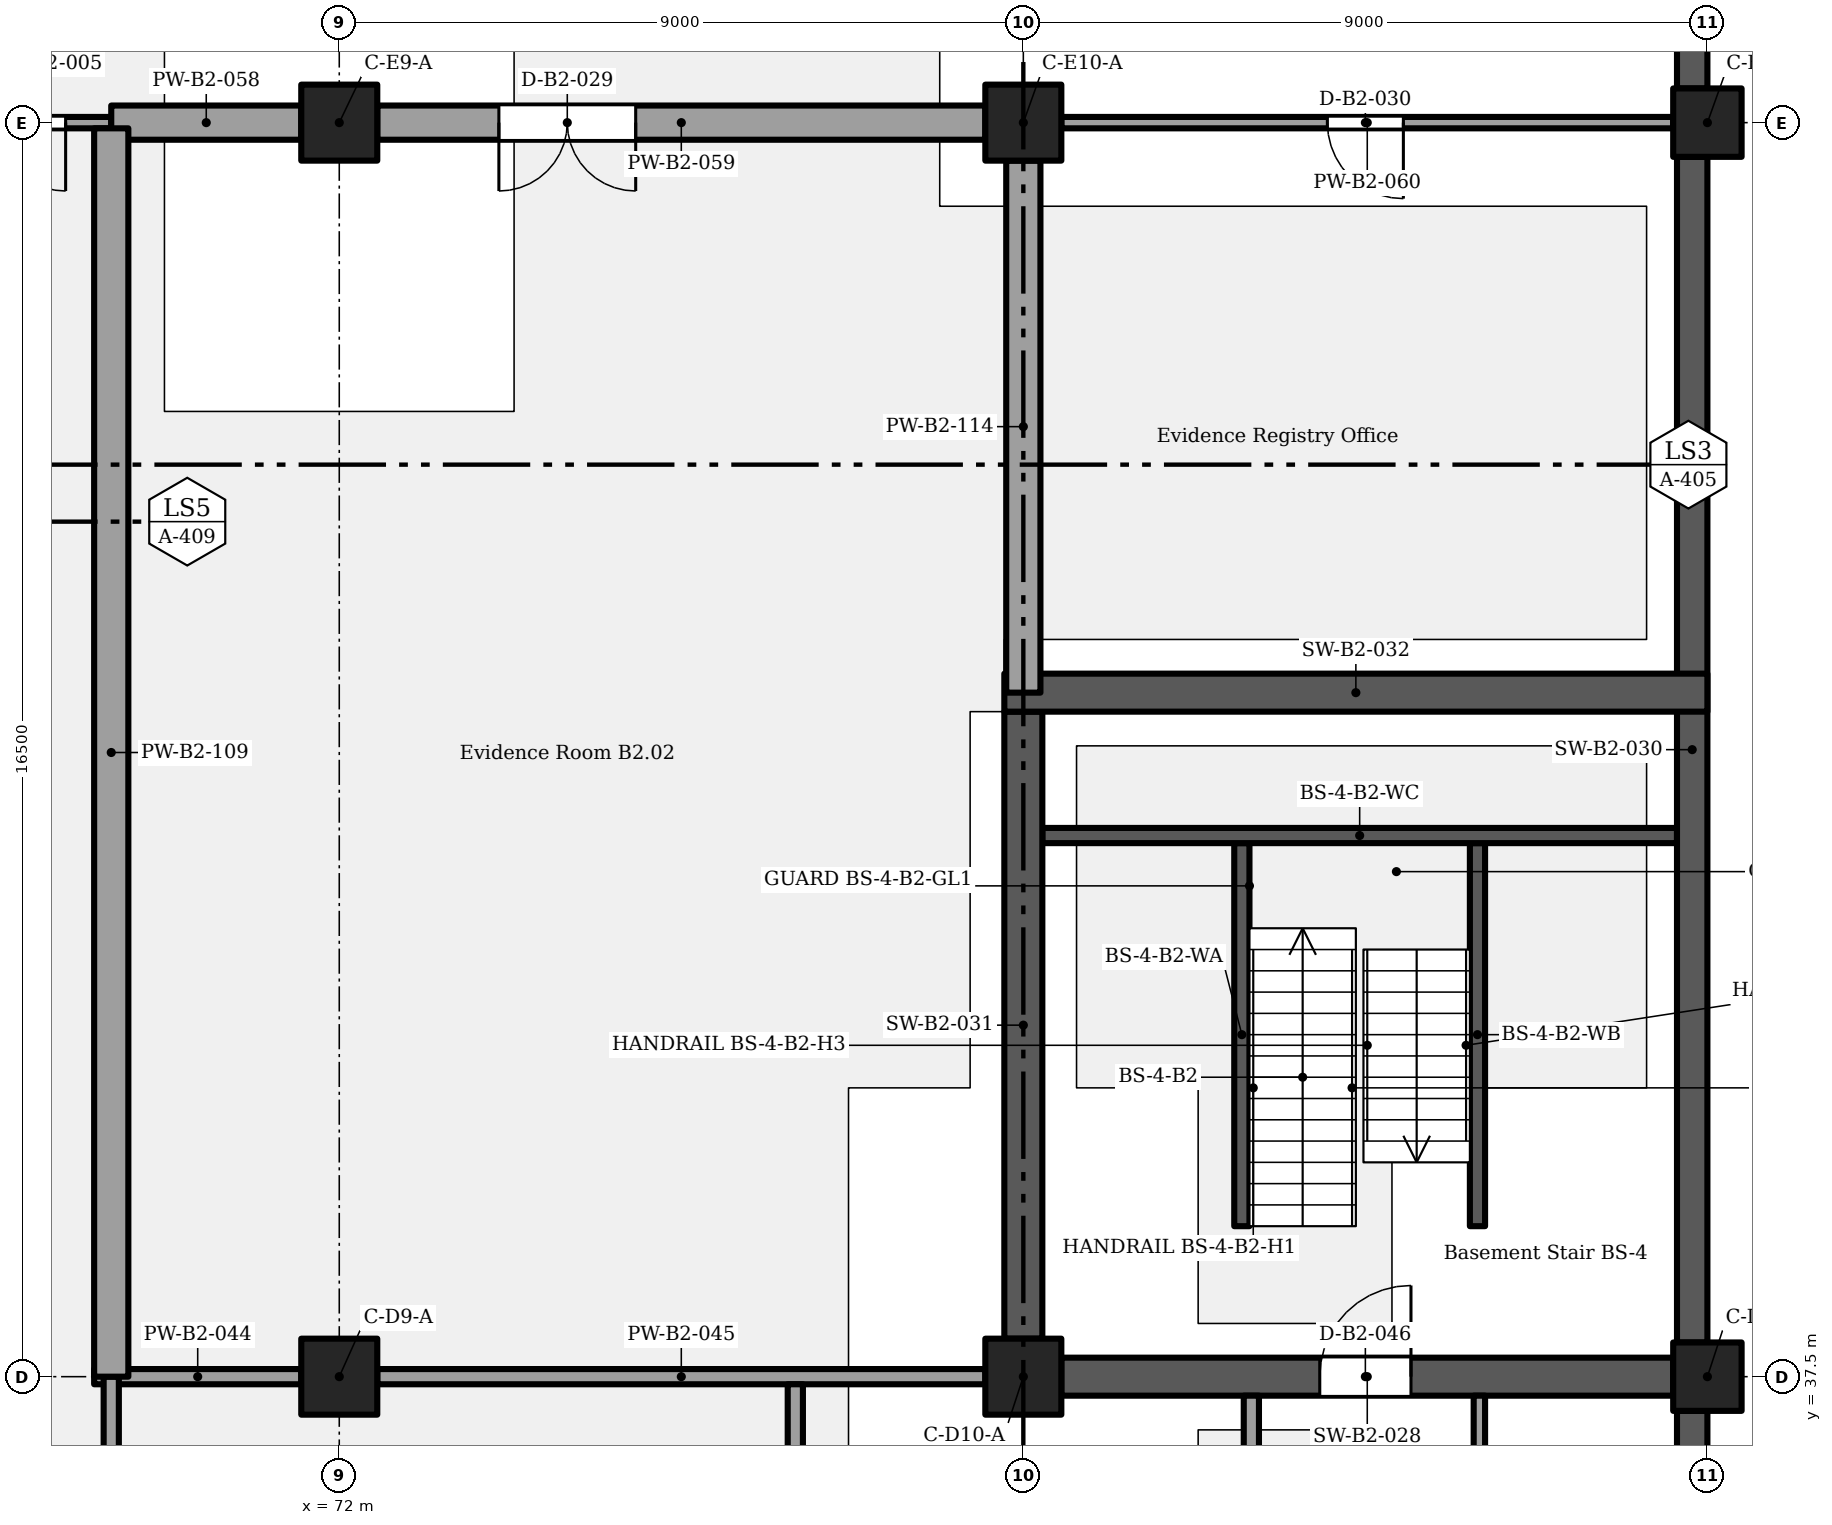
"""IFC4 building model, lengths in metres.
Left out: names, types, materials, properties, quantities, classifications, styles, units other than length and angle.
Written with IfcOpenShell. Run it as: python <this file> out.ifc"""

import sys

from ifc_helpers import new_model, si_unit, direction, frame, frame_2d, origin, origin_2d, place, context, subcontext, project, spatial, rectangle, extrude, element, fill, save


model = new_model("IFC4")
c1 = context("Model", 3, precision=1e-05, world=origin(), true_north=direction((0.0, 1.0)))
c2 = subcontext(c1, "Body", "Model", "MODEL_VIEW")
j1 = project(units=[si_unit("LENGTHUNIT", "METRE"), si_unit("PLANEANGLEUNIT", "RADIAN")], contexts=[c1])
p1 = place(None, origin())
s1 = spatial("IfcSite", under=j1, at=p1, CompositionType="ELEMENT")
p2 = place(p1, origin())
s2 = spatial("IfcBuilding", under=s1, at=p2, CompositionType="ELEMENT")
p3 = place(p2, frame((0.0, 0.0, -8.4)))
s3 = spatial("IfcBuildingStorey", under=s2, at=p3, CompositionType="ELEMENT", Elevation=-8.4)
for number, where, z_axis, x_axis in (
    (1, (72.0, 37.5, 0.0), (0.0, 0.0, 1.0), (1.0, 0.0, 0.0)),
    (2, (81.0, 37.5, 0.0), (0.0, 0.0, 1.0), (1.0, 0.0, 0.0)),
):
    element("IfcColumn", number, at=place(p3, frame(where, z_axis=z_axis, x_axis=x_axis)), inside=s3, PredefinedType="COLUMN", context=c2, shape_type="SweptSolid", body=[
        extrude(rectangle(XDim=1.0, YDim=1.0, at=origin_2d()), origin(), (0.0, 0.0, 1.0), 4.2),
    ])
p4 = place(p3, frame((90.0, 37.5, 0.0), z_axis=(0.0, 0.0, 1.0), x_axis=(1.0, 0.0, 0.0)))
e3 = element("IfcColumn", 3, at=p4, inside=s3, PredefinedType="COLUMN", context=c2, shape_type="SweptSolid", body=[
    extrude(rectangle(XDim=0.9, YDim=0.9, at=origin_2d()), origin(), (0.0, 0.0, 1.0), 4.2),
])
for number, where, z_axis, x_axis in (
    (4, (72.0, 54.0, 0.0), (0.0, 0.0, 1.0), (1.0, 0.0, 0.0)),
    (5, (81.0, 54.0, 0.0), (0.0, 0.0, 1.0), (1.0, 0.0, 0.0)),
):
    element("IfcColumn", number, at=place(p3, frame(where, z_axis=z_axis, x_axis=x_axis)), inside=s3, PredefinedType="COLUMN", context=c2, shape_type="SweptSolid", body=[
        extrude(rectangle(XDim=1.0, YDim=1.0, at=origin_2d()), origin(), (0.0, 0.0, 1.0), 4.2),
    ])
p5 = place(p3, frame((90.0, 54.0, 0.0), z_axis=(0.0, 0.0, 1.0), x_axis=(1.0, 0.0, 0.0)))
e6 = element("IfcColumn", 6, at=p5, inside=s3, PredefinedType="COLUMN", context=c2, shape_type="SweptSolid", body=[
    extrude(rectangle(XDim=0.9, YDim=0.9, at=origin_2d()), origin(), (0.0, 0.0, 1.0), 4.2),
])
p6 = place(p3, frame((89.8, 28.95, 0.0), z_axis=(0.0, 0.0, 1.0), x_axis=(0.0, 1.0, 0.0)))
e7 = element("IfcWall", 7, at=p6, inside=s3, PredefinedType="SOLIDWALL", context=c2, shape_type="SweptSolid", body=[
    extrude(rectangle(XDim=8.1, YDim=0.4, at=frame_2d((4.05, 0.0))), origin(), (0.0, 0.0, 1.0), 3.8),
])
p7 = place(p3, frame((81.5, 37.5, 0.0), z_axis=(0.0, 0.0, 1.0), x_axis=(1.0, 0.0, 0.0)))
e8 = element("IfcWall", 8, at=p7, inside=s3, PredefinedType="SHEAR", context=c2, shape_type="SweptSolid", body=[
    extrude(rectangle(XDim=8.05, YDim=0.5, at=frame_2d((4.025, 0.0))), origin(), (0.0, 0.0, 1.0), 3.8),
])
p8 = place(p7, frame((3.4, 0.0, 0.0)))
e9 = element("IfcOpeningElement", 9, at=p8, cuts=e8, PredefinedType="OPENING", context=c2, shape_type="SweptSolid", body=[
    extrude(rectangle(XDim=1.2, YDim=2.1, at=frame_2d((0.6, 1.05))), frame((0.0, 0.26, 0.0), z_axis=(0.0, -1.0, 0.0), x_axis=(1.0, 0.0, 0.0)), (0.0, 0.0, 1.0), 0.52),
])
p9 = place(p3, frame((89.8, 37.95, 0.0), z_axis=(0.0, 0.0, 1.0), x_axis=(0.0, 1.0, 0.0)))
e10 = element("IfcWall", 10, at=p9, inside=s3, PredefinedType="SOLIDWALL", context=c2, shape_type="SweptSolid", body=[
    extrude(rectangle(XDim=15.6, YDim=0.4, at=frame_2d((7.8, 0.0))), origin(), (0.0, 0.0, 1.0), 3.8),
])
p10 = place(p3, frame((81.0, 38.0, 0.0), z_axis=(0.0, 0.0, 1.0), x_axis=(0.0, 1.0, 0.0)))
e11 = element("IfcWall", 11, at=p10, inside=s3, PredefinedType="SHEAR", context=c2, shape_type="SweptSolid", body=[
    extrude(rectangle(XDim=8.25, YDim=0.5, at=frame_2d((4.125, 0.0))), origin(), (0.0, 0.0, 1.0), 3.8),
])
p11 = place(p3, frame((80.75, 46.5, 0.0), z_axis=(0.0, 0.0, 1.0), x_axis=(1.0, 0.0, 0.0)))
e12 = element("IfcWall", 12, at=p11, inside=s3, PredefinedType="SHEAR", context=c2, shape_type="SweptSolid", body=[
    extrude(rectangle(XDim=9.25, YDim=0.5, at=frame_2d((4.625, 0.0))), origin(), (0.0, 0.0, 1.0), 3.8),
])
p12 = place(p3, frame((89.8, 54.45, 0.0), z_axis=(0.0, 0.0, 1.0), x_axis=(0.0, 1.0, 0.0)))
e13 = element("IfcWall", 13, at=p12, inside=s3, PredefinedType="SOLIDWALL", context=c2, shape_type="SweptSolid", body=[
    extrude(rectangle(XDim=11.1, YDim=0.4, at=frame_2d((5.55, 0.0))), origin(), (0.0, 0.0, 1.0), 3.8),
])
p13 = place(p3, frame((68.775, 37.5, 0.0), z_axis=(0.0, 0.0, 1.0), x_axis=(1.0, 0.0, 0.0)))
e14 = element("IfcWall", 14, at=p13, inside=s3, PredefinedType="PARTITIONING", context=c2, shape_type="SweptSolid", body=[
    extrude(rectangle(XDim=2.725, YDim=0.2, at=frame_2d((1.363, 0.0))), origin(), (0.0, 0.0, 1.0), 3.05),
])
p14 = place(p3, frame((72.5, 37.5, 0.0), z_axis=(0.0, 0.0, 1.0), x_axis=(1.0, 0.0, 0.0)))
e15 = element("IfcWall", 15, at=p14, inside=s3, PredefinedType="PARTITIONING", context=c2, shape_type="SweptSolid", body=[
    extrude(rectangle(XDim=8.0, YDim=0.2, at=frame_2d((4.0, 0.0))), origin(), (0.0, 0.0, 1.0), 3.05),
])
p15 = place(p3, frame((66.0, 54.0, 0.0), z_axis=(0.0, 0.0, 1.0), x_axis=(1.0, 0.0, 0.0)))
e16 = element("IfcWall", 16, at=p15, inside=s3, PredefinedType="PARTITIONING", context=c2, shape_type="SweptSolid", body=[
    extrude(rectangle(XDim=3.0, YDim=0.15, at=frame_2d((1.5, 0.0))), origin(), (0.0, 0.0, 1.0), 3.05),
])
p16 = place(p15, frame((2.4, 0.0, 0.0), z_axis=(0.0, 0.0, 1.0), x_axis=(-1.0, 0.0, 0.0)))
e17 = element("IfcOpeningElement", 17, at=p16, cuts=e16, PredefinedType="OPENING", context=c2, shape_type="SweptSolid", body=[
    extrude(rectangle(XDim=1.8, YDim=2.1, at=frame_2d((0.9, 1.05))), frame((0.0, 0.085, 0.0), z_axis=(0.0, -1.0, 0.0), x_axis=(1.0, 0.0, 0.0)), (0.0, 0.0, 1.0), 0.17),
])
p17 = place(p3, frame((69.0, 54.0, 0.0), z_axis=(0.0, 0.0, 1.0), x_axis=(1.0, 0.0, 0.0)))
e18 = element("IfcWall", 18, at=p17, inside=s3, PredefinedType="PARTITIONING", context=c2, shape_type="SweptSolid", body=[
    extrude(rectangle(XDim=2.5, YDim=0.45, at=frame_2d((1.25, 0.0))), origin(), (0.0, 0.0, 1.0), 3.05),
])
p18 = place(p3, frame((72.5, 54.0, 0.0), z_axis=(0.0, 0.0, 1.0), x_axis=(1.0, 0.0, 0.0)))
e19 = element("IfcWall", 19, at=p18, inside=s3, PredefinedType="PARTITIONING", context=c2, shape_type="SweptSolid", body=[
    extrude(rectangle(XDim=8.0, YDim=0.45, at=frame_2d((4.0, 0.0))), origin(), (0.0, 0.0, 1.0), 3.05),
])
p19 = place(p18, frame((3.4, 0.0, 0.0), z_axis=(0.0, 0.0, 1.0), x_axis=(-1.0, 0.0, 0.0)))
e20 = element("IfcOpeningElement", 20, at=p19, cuts=e19, PredefinedType="OPENING", context=c2, shape_type="SweptSolid", body=[
    extrude(rectangle(XDim=1.8, YDim=2.4, at=frame_2d((0.9, 1.2))), frame((0.0, 0.235, 0.0), z_axis=(0.0, -1.0, 0.0), x_axis=(1.0, 0.0, 0.0)), (0.0, 0.0, 1.0), 0.47),
])
p20 = place(p3, frame((81.5, 54.0, 0.0), z_axis=(0.0, 0.0, 1.0), x_axis=(1.0, 0.0, 0.0)))
e21 = element("IfcWall", 21, at=p20, inside=s3, PredefinedType="PARTITIONING", context=c2, shape_type="SweptSolid", body=[
    extrude(rectangle(XDim=8.05, YDim=0.15, at=frame_2d((4.025, 0.0))), origin(), (0.0, 0.0, 1.0), 3.05),
])
p21 = place(p20, frame((4.5, 0.0, 0.0), z_axis=(0.0, 0.0, 1.0), x_axis=(-1.0, 0.0, 0.0)))
e22 = element("IfcOpeningElement", 22, at=p21, cuts=e21, PredefinedType="OPENING", context=c2, shape_type="SweptSolid", body=[
    extrude(rectangle(XDim=1.0, YDim=2.1, at=frame_2d((0.5, 1.05))), frame((0.0, 0.085, 0.0), z_axis=(0.0, -1.0, 0.0), x_axis=(1.0, 0.0, 0.0)), (0.0, 0.0, 1.0), 0.17),
])
p22 = place(p3, frame((69.0, 31.5, 0.0), z_axis=(0.0, 0.0, 1.0), x_axis=(0.0, 1.0, 0.0)))
e23 = element("IfcWall", 23, at=p22, inside=s3, PredefinedType="PARTITIONING", context=c2, shape_type="SweptSolid", body=[
    extrude(rectangle(XDim=6.0, YDim=0.2, at=frame_2d((3.0, 0.0))), origin(), (0.0, 0.0, 1.0), 3.8),
])
p23 = place(p3, frame((69.0, 37.5, 0.0), z_axis=(0.0, 0.0, 1.0), x_axis=(0.0, 1.0, 0.0)))
e24 = element("IfcWall", 24, at=p23, inside=s3, PredefinedType="PARTITIONING", context=c2, shape_type="SweptSolid", body=[
    extrude(rectangle(XDim=16.425, YDim=0.45, at=frame_2d((8.212, 0.0))), origin(), (0.0, 0.0, 1.0), 3.8),
])
p24 = place(p3, frame((78.0, 31.6, 0.0), z_axis=(0.0, 0.0, 1.0), x_axis=(0.0, 1.0, 0.0)))
e25 = element("IfcWall", 25, at=p24, inside=s3, PredefinedType="PARTITIONING", context=c2, shape_type="SweptSolid", body=[
    extrude(rectangle(XDim=5.8, YDim=0.2, at=frame_2d((2.9, 0.0))), origin(), (0.0, 0.0, 1.0), 3.8),
])
p25 = place(p3, frame((81.0, 46.5, 0.0), z_axis=(0.0, 0.0, 1.0), x_axis=(0.0, 1.0, 0.0)))
e26 = element("IfcWall", 26, at=p25, inside=s3, PredefinedType="PARTITIONING", context=c2, shape_type="SweptSolid", body=[
    extrude(rectangle(XDim=7.0, YDim=0.45, at=frame_2d((3.5, 0.0))), origin(), (0.0, 0.0, 1.0), 2.85),
])
p26 = place(p3, frame((84.0, 31.6, 0.0), z_axis=(0.0, 0.0, 1.0), x_axis=(0.0, 1.0, 0.0)))
e27 = element("IfcWall", 27, at=p26, inside=s3, PredefinedType="PARTITIONING", context=c2, shape_type="SweptSolid", body=[
    extrude(rectangle(XDim=5.65, YDim=0.2, at=frame_2d((2.825, 0.0))), origin(), (0.0, 0.0, 1.0), 3.8),
])
p27 = place(p3, frame((87.0, 31.575, 0.0), z_axis=(0.0, 0.0, 1.0), x_axis=(0.0, 1.0, 0.0)))
e28 = element("IfcWall", 28, at=p27, inside=s3, PredefinedType="PARTITIONING", context=c2, shape_type="SweptSolid", body=[
    extrude(rectangle(XDim=5.675, YDim=0.15, at=frame_2d((2.837, 0.0))), origin(), (0.0, 0.0, 1.0), 3.8),
])
for number, where, z_axis, x_axis in (
    (29, (83.875, 39.48, 0.0), (0.0, 0.0, 1.0), (0.0, 1.0, 0.0)),
    (30, (86.975, 39.48, 0.0), (0.0, 0.0, 1.0), (0.0, 1.0, 0.0)),
):
    element("IfcWall", number, at=place(p3, frame(where, z_axis=z_axis, x_axis=x_axis)), inside=s3, PredefinedType="SHEAR", context=c2, shape_type="SweptSolid", body=[
        extrude(rectangle(XDim=5.04, YDim=0.2, at=frame_2d((2.52, 0.0))), origin(), (0.0, 0.0, 1.0), 3.8),
    ])
p28 = place(p3, frame((81.25, 44.62, 0.0), z_axis=(0.0, 0.0, 1.0), x_axis=(1.0, 0.0, 0.0)))
e31 = element("IfcWall", 31, at=p28, inside=s3, PredefinedType="SHEAR", context=c2, shape_type="SweptSolid", body=[
    extrude(rectangle(XDim=8.35, YDim=0.2, at=frame_2d((4.175, 0.0))), origin(), (0.0, 0.0, 1.0), 3.8),
])
p29 = place(p16, origin())
e32 = element("IfcDoor", 32, at=p29, inside=s3, OperationType="DOUBLE_DOOR_SINGLE_SWING", PredefinedType="DOOR", context=c2, shape_type="SweptSolid", body=[
    extrude(rectangle(XDim=1.8, YDim=2.1, at=frame_2d((0.9, 1.05))), frame((0.0, 0.025, 0.0), z_axis=(0.0, -1.0, 0.0), x_axis=(1.0, 0.0, 0.0)), (0.0, 0.0, 1.0), 0.05),
])
fill(e17, e32)
p30 = place(p19, origin())
e33 = element("IfcDoor", 33, at=p30, inside=s3, OperationType="DOUBLE_DOOR_SINGLE_SWING", PredefinedType="DOOR", context=c2, shape_type="SweptSolid", body=[
    extrude(rectangle(XDim=1.8, YDim=2.4, at=frame_2d((0.9, 1.2))), frame((0.0, 0.025, 0.0), z_axis=(0.0, -1.0, 0.0), x_axis=(1.0, 0.0, 0.0)), (0.0, 0.0, 1.0), 0.05),
])
fill(e20, e33)
p31 = place(p21, origin())
e34 = element("IfcDoor", 34, at=p31, inside=s3, OperationType="SINGLE_SWING_LEFT", PredefinedType="DOOR", context=c2, shape_type="SweptSolid", body=[
    extrude(rectangle(XDim=1.0, YDim=2.1, at=frame_2d((0.5, 1.05))), frame((0.0, 0.025, 0.0), z_axis=(0.0, -1.0, 0.0), x_axis=(1.0, 0.0, 0.0)), (0.0, 0.0, 1.0), 0.05),
])
fill(e22, e34)
p32 = place(p8, origin())
e35 = element("IfcDoor", 35, at=p32, inside=s3, OperationType="SINGLE_SWING_RIGHT", PredefinedType="DOOR", context=c2, shape_type="SweptSolid", body=[
    extrude(rectangle(XDim=1.2, YDim=2.1, at=frame_2d((0.6, 1.05))), frame((0.0, 0.025, 0.0), z_axis=(0.0, -1.0, 0.0), x_axis=(1.0, 0.0, 0.0)), (0.0, 0.0, 1.0), 0.05),
])
fill(e9, e35)
save(model, sys.argv[1])
